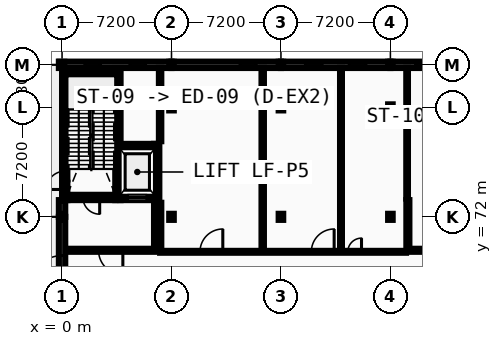
"""IFC4 building model, lengths in metres.
Left out: names, types, materials, properties, quantities, classifications, styles, units other than length and angle.
Written with IfcOpenShell. Run it as: python <this file> out.ifc"""

import sys

from ifc_helpers import new_model, si_unit, direction, frame, frame_2d, origin, origin_2d, place, context, subcontext, project, spatial, rectangle, i_section, extrude, element, fill, save


model = new_model("IFC4")
c1 = context("Model", 3, precision=1e-05, world=origin(), true_north=direction((0.0, 1.0)))
c2 = subcontext(c1, "Body", "Model", "MODEL_VIEW")
j1 = project(units=[si_unit("LENGTHUNIT", "METRE"), si_unit("PLANEANGLEUNIT", "RADIAN")], contexts=[c1])
p1 = place(None, origin())
s1 = spatial("IfcSite", under=j1, at=p1, CompositionType="ELEMENT")
p2 = place(p1, origin())
s2 = spatial("IfcBuilding", under=s1, at=p2, CompositionType="ELEMENT")
p3 = place(p2, origin())
s3 = spatial("IfcBuildingStorey", under=s2, at=p3, CompositionType="ELEMENT", Elevation=0.0)
for number, where, z_axis, x_axis in (
    (1, (0.0, 72.0, 0.0), (0.0, 0.0, 1.0), (1.0, 0.0, 0.0)),
    (2, (0.0, 82.0, 0.0), (0.0, 0.0, 1.0), (1.0, 0.0, 0.0)),
    (3, (7.2, 72.0, 0.0), (0.0, 0.0, 1.0), (1.0, 0.0, 0.0)),
    (4, (7.2, 79.2, 0.0), (0.0, 0.0, 1.0), (1.0, 0.0, 0.0)),
    (5, (7.2, 82.0, 0.0), (0.0, 0.0, 1.0), (1.0, 0.0, 0.0)),
    (6, (14.4, 72.0, 0.0), (0.0, 0.0, 1.0), (1.0, 0.0, 0.0)),
    (7, (14.4, 79.2, 0.0), (0.0, 0.0, 1.0), (1.0, 0.0, 0.0)),
    (8, (14.4, 82.0, 0.0), (0.0, 0.0, 1.0), (1.0, 0.0, 0.0)),
    (9, (21.6, 72.0, 0.0), (0.0, 0.0, 1.0), (1.0, 0.0, 0.0)),
    (10, (21.6, 79.2, 0.0), (0.0, 0.0, 1.0), (1.0, 0.0, 0.0)),
    (11, (21.6, 82.0, 0.0), (0.0, 0.0, 1.0), (1.0, 0.0, 0.0)),
):
    element("IfcColumn", number, at=place(p3, frame(where, z_axis=z_axis, x_axis=x_axis)), inside=s3, PredefinedType="COLUMN", context=c2, shape_type="SweptSolid", body=[
        extrude(i_section(OverallWidth=0.3, OverallDepth=0.4, WebThickness=0.013, FlangeThickness=0.024, FilletRadius=0.027, at=origin_2d()), origin(), (0.0, 0.0, 1.0), 5.2),
    ])
p4 = place(p3, frame((7.2, 82.0, 0.0), z_axis=(0.0, 0.0, 1.0), x_axis=(-1.0, 0.0, 0.0)))
e12 = element("IfcWall", 12, at=p4, inside=s3, PredefinedType="STANDARD", context=c2, shape_type="SweptSolid", body=[
    extrude(rectangle(XDim=7.41, YDim=0.42, at=frame_2d((3.705, 0.0))), origin(), (0.0, 0.0, 1.0), 4.635),
])
p5 = place(p4, frame((1.708, 0.0, 0.95)))
e13 = element("IfcOpeningElement", 13, at=p5, cuts=e12, PredefinedType="OPENING", context=c2, shape_type="SweptSolid", body=[
    extrude(rectangle(XDim=1.03, YDim=1.404, at=frame_2d((0.515, 0.702))), frame((0.0, 0.22, 0.0), z_axis=(0.0, -1.0, 0.0), x_axis=(1.0, 0.0, 0.0)), (0.0, 0.0, 1.0), 0.44),
])
p6 = place(p4, frame((4.672, 0.0, 0.95)))
e14 = element("IfcOpeningElement", 14, at=p6, cuts=e12, PredefinedType="OPENING", context=c2, shape_type="SweptSolid", body=[
    extrude(rectangle(XDim=1.03, YDim=1.404, at=frame_2d((0.515, 0.702))), frame((0.0, 0.22, 0.0), z_axis=(0.0, -1.0, 0.0), x_axis=(1.0, 0.0, 0.0)), (0.0, 0.0, 1.0), 0.44),
])
p7 = place(p3, frame((14.4, 82.0, 0.0), z_axis=(0.0, 0.0, 1.0), x_axis=(-1.0, 0.0, 0.0)))
e15 = element("IfcWall", 15, at=p7, inside=s3, PredefinedType="STANDARD", context=c2, shape_type="SweptSolid", body=[
    extrude(rectangle(XDim=7.2, YDim=0.42, at=frame_2d((3.6, 0.0))), origin(), (0.0, 0.0, 1.0), 4.635),
])
p8 = place(p7, frame((1.628, 0.0, 0.95)))
e16 = element("IfcOpeningElement", 16, at=p8, cuts=e15, PredefinedType="OPENING", context=c2, shape_type="SweptSolid", body=[
    extrude(rectangle(XDim=1.064, YDim=1.404, at=frame_2d((0.532, 0.702))), frame((0.0, 0.22, 0.0), z_axis=(0.0, -1.0, 0.0), x_axis=(1.0, 0.0, 0.0)), (0.0, 0.0, 1.0), 0.44),
])
p9 = place(p3, frame((21.6, 82.0, 0.0), z_axis=(0.0, 0.0, 1.0), x_axis=(-1.0, 0.0, 0.0)))
e17 = element("IfcWall", 17, at=p9, inside=s3, PredefinedType="STANDARD", context=c2, shape_type="SweptSolid", body=[
    extrude(rectangle(XDim=7.2, YDim=0.42, at=frame_2d((3.6, 0.0))), origin(), (0.0, 0.0, 1.0), 4.635),
])
p10 = place(p9, frame((1.611, 0.0, 0.95)))
e18 = element("IfcOpeningElement", 18, at=p10, cuts=e17, PredefinedType="OPENING", context=c2, shape_type="SweptSolid", body=[
    extrude(rectangle(XDim=1.098, YDim=1.404, at=frame_2d((0.549, 0.702))), frame((0.0, 0.22, 0.0), z_axis=(0.0, -1.0, 0.0), x_axis=(1.0, 0.0, 0.0)), (0.0, 0.0, 1.0), 0.44),
])
p11 = place(p9, frame((4.491, 0.0, 0.95)))
e19 = element("IfcOpeningElement", 19, at=p11, cuts=e17, PredefinedType="OPENING", context=c2, shape_type="SweptSolid", body=[
    extrude(rectangle(XDim=1.098, YDim=1.404, at=frame_2d((0.549, 0.702))), frame((0.0, 0.22, 0.0), z_axis=(0.0, -1.0, 0.0), x_axis=(1.0, 0.0, 0.0)), (0.0, 0.0, 1.0), 0.44),
])
p12 = place(p3, frame((29.01, 82.0, 0.0), z_axis=(0.0, 0.0, 1.0), x_axis=(-1.0, 0.0, 0.0)))
e20 = element("IfcWall", 20, at=p12, inside=s3, PredefinedType="STANDARD", context=c2, shape_type="SweptSolid", body=[
    extrude(rectangle(XDim=7.41, YDim=0.42, at=frame_2d((3.705, 0.0))), origin(), (0.0, 0.0, 1.0), 4.635),
])
p13 = place(p12, frame((1.657, 0.0, 0.95)))
e21 = element("IfcOpeningElement", 21, at=p13, cuts=e20, PredefinedType="OPENING", context=c2, shape_type="SweptSolid", body=[
    extrude(rectangle(XDim=1.132, YDim=1.404, at=frame_2d((0.566, 0.702))), frame((0.0, 0.22, 0.0), z_axis=(0.0, -1.0, 0.0), x_axis=(1.0, 0.0, 0.0)), (0.0, 0.0, 1.0), 0.44),
])
p14 = place(p12, frame((4.621, 0.0, 0.95)))
e22 = element("IfcOpeningElement", 22, at=p14, cuts=e20, PredefinedType="OPENING", context=c2, shape_type="SweptSolid", body=[
    extrude(rectangle(XDim=1.132, YDim=1.404, at=frame_2d((0.566, 0.702))), frame((0.0, 0.22, 0.0), z_axis=(0.0, -1.0, 0.0), x_axis=(1.0, 0.0, 0.0)), (0.0, 0.0, 1.0), 0.44),
])
p15 = place(p3, frame((0.0, 72.0, 0.0), z_axis=(0.0, 0.0, 1.0), x_axis=(0.0, -1.0, 0.0)))
e23 = element("IfcWall", 23, at=p15, inside=s3, PredefinedType="STANDARD", context=c2, shape_type="SweptSolid", body=[
    extrude(rectangle(XDim=7.2, YDim=0.42, at=frame_2d((3.6, 0.0))), origin(), (0.0, 0.0, 1.0), 4.565),
])
p16 = place(p15, frame((2.55, 0.0, 0.0)))
e24 = element("IfcOpeningElement", 24, at=p16, cuts=e23, PredefinedType="OPENING", context=c2, shape_type="SweptSolid", body=[
    extrude(rectangle(XDim=2.1, YDim=2.4, at=frame_2d((1.05, 1.2))), frame((0.0, 0.22, 0.0), z_axis=(0.0, -1.0, 0.0), x_axis=(1.0, 0.0, 0.0)), (0.0, 0.0, 1.0), 0.44),
])
p17 = place(p3, frame((0.0, 73.1, 0.0), z_axis=(0.0, 0.0, 1.0), x_axis=(0.0, -1.0, 0.0)))
e25 = element("IfcWall", 25, at=p17, inside=s3, PredefinedType="STANDARD", context=c2, shape_type="SweptSolid", body=[
    extrude(rectangle(XDim=1.1, YDim=0.42, at=frame_2d((0.55, 0.0))), origin(), (0.0, 0.0, 1.0), 4.94),
])
p18 = place(p3, frame((0.35, 73.275, 0.0), z_axis=(0.0, 0.0, 1.0), x_axis=(1.0, 0.0, 0.0)))
e26 = element("IfcWall", 26, at=p18, inside=s3, PredefinedType="SHEAR", context=c2, shape_type="SweptSolid", body=[
    extrude(rectangle(XDim=3.15, YDim=0.35, at=frame_2d((1.575, 0.0))), origin(), (0.0, 0.0, 1.0), 4.94),
])
p19 = place(p18, frame((1.025, 0.0, 0.0)))
e27 = element("IfcOpeningElement", 27, at=p19, cuts=e26, PredefinedType="OPENING", context=c2, shape_type="SweptSolid", body=[
    extrude(rectangle(XDim=1.1, YDim=2.15, at=frame_2d((0.55, 1.075))), frame((0.0, 0.185, 0.0), z_axis=(0.0, -1.0, 0.0), x_axis=(1.0, 0.0, 0.0)), (0.0, 0.0, 1.0), 0.37),
])
p20 = place(p3, frame((0.35, 81.425, 0.0), z_axis=(0.0, 0.0, 1.0), x_axis=(1.0, 0.0, 0.0)))
e28 = element("IfcWall", 28, at=p20, inside=s3, PredefinedType="SHEAR", context=c2, shape_type="SweptSolid", body=[
    extrude(rectangle(XDim=3.15, YDim=0.35, at=frame_2d((1.575, 0.0))), origin(), (0.0, 0.0, 1.0), 4.94),
])
p21 = place(p3, frame((0.175, 73.1, 0.0), z_axis=(0.0, 0.0, 1.0), x_axis=(0.0, 1.0, 0.0)))
e29 = element("IfcWall", 29, at=p21, inside=s3, PredefinedType="SHEAR", context=c2, shape_type="SweptSolid", body=[
    extrude(rectangle(XDim=8.69, YDim=0.35, at=frame_2d((4.345, 0.0))), origin(), (0.0, 0.0, 1.0), 4.94),
])
p22 = place(p21, frame((0.7, 0.0, 0.0)))
e30 = element("IfcOpeningElement", 30, at=p22, cuts=e29, PredefinedType="OPENING", context=c2, shape_type="SweptSolid", body=[
    extrude(rectangle(XDim=1.2, YDim=2.15, at=frame_2d((0.6, 1.075))), frame((0.0, 0.185, 0.0), z_axis=(0.0, -1.0, 0.0), x_axis=(1.0, 0.0, 0.0)), (0.0, 0.0, 1.0), 0.37),
])
p23 = place(p3, frame((3.675, 73.1, 0.0), z_axis=(0.0, 0.0, 1.0), x_axis=(0.0, 1.0, 0.0)))
e31 = element("IfcWall", 31, at=p23, inside=s3, PredefinedType="SHEAR", context=c2, shape_type="SweptSolid", body=[
    extrude(rectangle(XDim=8.69, YDim=0.35, at=frame_2d((4.345, 0.0))), origin(), (0.0, 0.0, 1.0), 4.94),
])
p24 = place(p3, frame((3.85, 73.275, 0.0), z_axis=(0.0, 0.0, 1.0), x_axis=(1.0, 0.0, 0.0)))
e32 = element("IfcWall", 32, at=p24, inside=s3, PredefinedType="SHEAR", context=c2, shape_type="SweptSolid", body=[
    extrude(rectangle(XDim=2.2, YDim=0.35, at=frame_2d((1.1, 0.0))), origin(), (0.0, 0.0, 1.0), 4.94),
])
p25 = place(p24, frame((0.5, 0.0, 0.0)))
e33 = element("IfcOpeningElement", 33, at=p25, cuts=e32, PredefinedType="OPENING", context=c2, shape_type="SweptSolid", body=[
    extrude(rectangle(XDim=1.2, YDim=2.2, at=frame_2d((0.6, 1.1))), frame((0.0, 0.185, 0.0), z_axis=(0.0, -1.0, 0.0), x_axis=(1.0, 0.0, 0.0)), (0.0, 0.0, 1.0), 0.37),
])
p26 = place(p3, frame((3.85, 76.625, 0.0), z_axis=(0.0, 0.0, 1.0), x_axis=(1.0, 0.0, 0.0)))
e34 = element("IfcWall", 34, at=p26, inside=s3, PredefinedType="SHEAR", context=c2, shape_type="SweptSolid", body=[
    extrude(rectangle(XDim=2.2, YDim=0.35, at=frame_2d((1.1, 0.0))), origin(), (0.0, 0.0, 1.0), 4.94),
])
p27 = place(p3, frame((6.225, 73.1, 0.0), z_axis=(0.0, 0.0, 1.0), x_axis=(0.0, 1.0, 0.0)))
e35 = element("IfcWall", 35, at=p27, inside=s3, PredefinedType="SHEAR", context=c2, shape_type="SweptSolid", body=[
    extrude(rectangle(XDim=3.7, YDim=0.35, at=frame_2d((1.85, 0.0))), origin(), (0.0, 0.0, 1.0), 4.94),
])
p28 = place(p3, frame((0.35, 69.8, 0.0), z_axis=(0.0, 0.0, 1.0), x_axis=(1.0, 0.0, 0.0)))
e36 = element("IfcWall", 36, at=p28, inside=s3, PredefinedType="PARTITIONING", context=c2, shape_type="SweptSolid", body=[
    extrude(rectangle(XDim=5.7, YDim=0.2, at=frame_2d((2.85, 0.0))), origin(), (0.0, 0.0, 1.0), 4.94),
])
p29 = place(p28, frame((2.05, 0.0, 0.0)))
e37 = element("IfcOpeningElement", 37, at=p29, cuts=e36, PredefinedType="OPENING", context=c2, shape_type="SweptSolid", body=[
    extrude(rectangle(XDim=1.6, YDim=2.2, at=frame_2d((0.8, 1.1))), frame((0.0, 0.11, 0.0), z_axis=(0.0, -1.0, 0.0), x_axis=(1.0, 0.0, 0.0)), (0.0, 0.0, 1.0), 0.22),
])
p30 = place(p3, frame((6.15, 69.9, 0.0), z_axis=(0.0, 0.0, 1.0), x_axis=(0.0, 1.0, 0.0)))
e38 = element("IfcWall", 38, at=p30, inside=s3, PredefinedType="PARTITIONING", context=c2, shape_type="SweptSolid", body=[
    extrude(rectangle(XDim=3.2, YDim=0.2, at=frame_2d((1.6, 0.0))), origin(), (0.0, 0.0, 1.0), 4.94),
])
p31 = place(p3, frame((22.85, 69.8, 0.0), z_axis=(0.0, 0.0, 1.0), x_axis=(1.0, 0.0, 0.0)))
e39 = element("IfcWall", 39, at=p31, inside=s3, PredefinedType="PARTITIONING", context=c2, shape_type="SweptSolid", body=[
    extrude(rectangle(XDim=5.6, YDim=0.2, at=frame_2d((2.8, 0.0))), origin(), (0.0, 0.0, 1.0), 4.94),
])
p32 = place(p31, frame((2.0, 0.0, 0.0)))
e40 = element("IfcOpeningElement", 40, at=p32, cuts=e39, PredefinedType="OPENING", context=c2, shape_type="SweptSolid", body=[
    extrude(rectangle(XDim=1.6, YDim=2.2, at=frame_2d((0.8, 1.1))), frame((0.0, 0.11, 0.0), z_axis=(0.0, -1.0, 0.0), x_axis=(1.0, 0.0, 0.0)), (0.0, 0.0, 1.0), 0.22),
])
p33 = place(p3, frame((22.75, 69.9, 0.0), z_axis=(0.0, 0.0, 1.0), x_axis=(0.0, 1.0, 0.0)))
e41 = element("IfcWall", 41, at=p33, inside=s3, PredefinedType="PARTITIONING", context=c2, shape_type="SweptSolid", body=[
    extrude(rectangle(XDim=3.2, YDim=0.2, at=frame_2d((1.6, 0.0))), origin(), (0.0, 0.0, 1.0), 4.94),
])
p34 = place(p3, frame((6.45, 69.7, 0.0), z_axis=(0.0, 0.0, 1.0), x_axis=(1.0, 0.0, 0.0)))
e42 = element("IfcWall", 42, at=p34, inside=s3, PredefinedType="PARTITIONING", context=c2, shape_type="SweptSolid", body=[
    extrude(rectangle(XDim=16.18, YDim=0.125, at=frame_2d((8.09, 0.0))), origin(), (0.0, 0.0, 1.0), 4.94),
])
p35 = place(p34, frame((12.35, 0.0, 0.0)))
e43 = element("IfcOpeningElement", 43, at=p35, cuts=e42, PredefinedType="OPENING", context=c2, shape_type="SweptSolid", body=[
    extrude(rectangle(XDim=0.9, YDim=2.1, at=frame_2d((0.45, 1.05))), frame((0.0, 0.073, 0.0), z_axis=(0.0, -1.0, 0.0), x_axis=(1.0, 0.0, 0.0)), (0.0, 0.0, 1.0), 0.145),
])
p36 = place(p34, frame((9.95, 0.0, 0.0)))
e44 = element("IfcOpeningElement", 44, at=p36, cuts=e42, PredefinedType="OPENING", context=c2, shape_type="SweptSolid", body=[
    extrude(rectangle(XDim=1.5, YDim=2.2, at=frame_2d((0.75, 1.1))), frame((0.0, 0.073, 0.0), z_axis=(0.0, -1.0, 0.0), x_axis=(1.0, 0.0, 0.0)), (0.0, 0.0, 1.0), 0.145),
])
p37 = place(p34, frame((2.625, 0.0, 0.0)))
e45 = element("IfcOpeningElement", 45, at=p37, cuts=e42, PredefinedType="OPENING", context=c2, shape_type="SweptSolid", body=[
    extrude(rectangle(XDim=1.5, YDim=2.2, at=frame_2d((0.75, 1.1))), frame((0.0, 0.073, 0.0), z_axis=(0.0, -1.0, 0.0), x_axis=(1.0, 0.0, 0.0)), (0.0, 0.0, 1.0), 0.145),
])
p38 = place(p3, frame((6.45, 69.762, 0.0), z_axis=(0.0, 0.0, 1.0), x_axis=(0.0, 1.0, 0.0)))
e46 = element("IfcWall", 46, at=p38, inside=s3, PredefinedType="PARTITIONING", context=c2, shape_type="SweptSolid", body=[
    extrude(rectangle(XDim=3.163, YDim=0.158, at=frame_2d((1.581, 0.0))), origin(), (0.0, 0.0, 1.0), 4.94),
])
p39 = place(p3, frame((6.45, 76.975, 0.0), z_axis=(0.0, 0.0, 1.0), x_axis=(0.0, 1.0, 0.0)))
e47 = element("IfcWall", 47, at=p39, inside=s3, PredefinedType="PARTITIONING", context=c2, shape_type="SweptSolid", body=[
    extrude(rectangle(XDim=4.825, YDim=0.158, at=frame_2d((2.413, 0.0))), origin(), (0.0, 0.0, 1.0), 4.94),
])
p40 = place(p3, frame((13.2, 69.762, 0.0), z_axis=(0.0, 0.0, 1.0), x_axis=(0.0, 1.0, 0.0)))
e48 = element("IfcWall", 48, at=p40, inside=s3, PredefinedType="PARTITIONING", context=c2, shape_type="SweptSolid", body=[
    extrude(rectangle(XDim=12.038, YDim=0.158, at=frame_2d((6.019, 0.0))), origin(), (0.0, 0.0, 1.0), 4.94),
])
p41 = place(p3, frame((18.35, 69.762, 0.0), z_axis=(0.0, 0.0, 1.0), x_axis=(0.0, 1.0, 0.0)))
e49 = element("IfcWall", 49, at=p41, inside=s3, PredefinedType="PARTITIONING", context=c2, shape_type="SweptSolid", body=[
    extrude(rectangle(XDim=12.038, YDim=0.125, at=frame_2d((6.019, 0.0))), origin(), (0.0, 0.0, 1.0), 4.94),
])
p42 = place(p3, frame((22.7, 73.2, 0.0), z_axis=(0.0, 0.0, 1.0), x_axis=(0.0, 1.0, 0.0)))
e50 = element("IfcWall", 50, at=p42, inside=s3, PredefinedType="PARTITIONING", context=c2, shape_type="SweptSolid", body=[
    extrude(rectangle(XDim=8.6, YDim=0.11, at=frame_2d((4.3, 0.0))), origin(), (0.0, 0.0, 1.0), 4.94),
])
p43 = place(p5, origin())
e51 = element("IfcWindow", 51, at=p43, inside=s3, PartitioningType="SINGLE_PANEL", PredefinedType="WINDOW", context=c2, shape_type="SweptSolid", body=[
    extrude(rectangle(XDim=1.03, YDim=1.404, at=frame_2d((0.515, 0.702))), frame((0.0, 0.03, 0.0), z_axis=(0.0, -1.0, 0.0), x_axis=(1.0, 0.0, 0.0)), (0.0, 0.0, 1.0), 0.06),
])
fill(e13, e51)
p44 = place(p6, origin())
e52 = element("IfcWindow", 52, at=p44, inside=s3, PartitioningType="SINGLE_PANEL", PredefinedType="WINDOW", context=c2, shape_type="SweptSolid", body=[
    extrude(rectangle(XDim=1.03, YDim=1.404, at=frame_2d((0.515, 0.702))), frame((0.0, 0.03, 0.0), z_axis=(0.0, -1.0, 0.0), x_axis=(1.0, 0.0, 0.0)), (0.0, 0.0, 1.0), 0.06),
])
fill(e14, e52)
p45 = place(p8, origin())
e53 = element("IfcWindow", 53, at=p45, inside=s3, PartitioningType="SINGLE_PANEL", PredefinedType="WINDOW", context=c2, shape_type="SweptSolid", body=[
    extrude(rectangle(XDim=1.064, YDim=1.404, at=frame_2d((0.532, 0.702))), frame((0.0, 0.03, 0.0), z_axis=(0.0, -1.0, 0.0), x_axis=(1.0, 0.0, 0.0)), (0.0, 0.0, 1.0), 0.06),
])
fill(e16, e53)
p46 = place(p10, origin())
e54 = element("IfcWindow", 54, at=p46, inside=s3, PartitioningType="SINGLE_PANEL", PredefinedType="WINDOW", context=c2, shape_type="SweptSolid", body=[
    extrude(rectangle(XDim=1.098, YDim=1.404, at=frame_2d((0.549, 0.702))), frame((0.0, 0.03, 0.0), z_axis=(0.0, -1.0, 0.0), x_axis=(1.0, 0.0, 0.0)), (0.0, 0.0, 1.0), 0.06),
])
fill(e18, e54)
p47 = place(p11, origin())
e55 = element("IfcWindow", 55, at=p47, inside=s3, PartitioningType="SINGLE_PANEL", PredefinedType="WINDOW", context=c2, shape_type="SweptSolid", body=[
    extrude(rectangle(XDim=1.098, YDim=1.404, at=frame_2d((0.549, 0.702))), frame((0.0, 0.03, 0.0), z_axis=(0.0, -1.0, 0.0), x_axis=(1.0, 0.0, 0.0)), (0.0, 0.0, 1.0), 0.06),
])
fill(e19, e55)
p48 = place(p14, origin())
e56 = element("IfcWindow", 56, at=p48, inside=s3, PartitioningType="SINGLE_PANEL", PredefinedType="WINDOW", context=c2, shape_type="SweptSolid", body=[
    extrude(rectangle(XDim=1.132, YDim=1.404, at=frame_2d((0.566, 0.702))), frame((0.0, 0.03, 0.0), z_axis=(0.0, -1.0, 0.0), x_axis=(1.0, 0.0, 0.0)), (0.0, 0.0, 1.0), 0.06),
])
fill(e22, e56)
p49 = place(p16, origin())
e57 = element("IfcDoor", 57, at=p49, inside=s3, OperationType="DOUBLE_DOOR_SINGLE_SWING", PredefinedType="DOOR", context=c2, shape_type="SweptSolid", body=[
    extrude(rectangle(XDim=2.1, YDim=2.4, at=frame_2d((1.05, 1.2))), frame((0.0, 0.025, 0.0), z_axis=(0.0, -1.0, 0.0), x_axis=(1.0, 0.0, 0.0)), (0.0, 0.0, 1.0), 0.05),
])
fill(e24, e57)
p50 = place(p19, origin())
e58 = element("IfcDoor", 58, at=p50, inside=s3, OperationType="SINGLE_SWING_RIGHT", PredefinedType="DOOR", context=c2, shape_type="SweptSolid", body=[
    extrude(rectangle(XDim=1.1, YDim=2.15, at=frame_2d((0.55, 1.075))), frame((0.0, 0.025, 0.0), z_axis=(0.0, -1.0, 0.0), x_axis=(1.0, 0.0, 0.0)), (0.0, 0.0, 1.0), 0.05),
])
fill(e27, e58)
p51 = place(p22, origin())
e59 = element("IfcDoor", 59, at=p51, inside=s3, OperationType="SINGLE_SWING_LEFT", PredefinedType="DOOR", context=c2, shape_type="SweptSolid", body=[
    extrude(rectangle(XDim=1.2, YDim=2.15, at=frame_2d((0.6, 1.075))), frame((0.0, 0.025, 0.0), z_axis=(0.0, -1.0, 0.0), x_axis=(1.0, 0.0, 0.0)), (0.0, 0.0, 1.0), 0.05),
])
fill(e30, e59)
p52 = place(p25, origin())
e60 = element("IfcDoor", 60, at=p52, inside=s3, OperationType="SLIDING_TO_RIGHT", PredefinedType="DOOR", context=c2, shape_type="SweptSolid", body=[
    extrude(rectangle(XDim=1.2, YDim=2.2, at=frame_2d((0.6, 1.1))), frame((0.0, 0.025, 0.0), z_axis=(0.0, -1.0, 0.0), x_axis=(1.0, 0.0, 0.0)), (0.0, 0.0, 1.0), 0.05),
])
fill(e33, e60)
p53 = place(p29, origin())
e61 = element("IfcDoor", 61, at=p53, inside=s3, OperationType="DOUBLE_DOOR_SINGLE_SWING", PredefinedType="DOOR", context=c2, shape_type="SweptSolid", body=[
    extrude(rectangle(XDim=1.6, YDim=2.2, at=frame_2d((0.8, 1.1))), frame((0.0, 0.025, 0.0), z_axis=(0.0, -1.0, 0.0), x_axis=(1.0, 0.0, 0.0)), (0.0, 0.0, 1.0), 0.05),
])
fill(e37, e61)
p54 = place(p35, frame((0.9, 0.0, 0.0), z_axis=(0.0, 0.0, 1.0), x_axis=(-1.0, 0.0, 0.0)))
e62 = element("IfcDoor", 62, at=p54, inside=s3, OperationType="SINGLE_SWING_RIGHT", PredefinedType="DOOR", context=c2, shape_type="SweptSolid", body=[
    extrude(rectangle(XDim=0.9, YDim=2.1, at=frame_2d((0.45, 1.05))), frame((0.0, 0.025, 0.0), z_axis=(0.0, -1.0, 0.0), x_axis=(1.0, 0.0, 0.0)), (0.0, 0.0, 1.0), 0.05),
])
fill(e43, e62)
p55 = place(p36, frame((1.5, 0.0, 0.0), z_axis=(0.0, 0.0, 1.0), x_axis=(-1.0, 0.0, 0.0)))
e63 = element("IfcDoor", 63, at=p55, inside=s3, OperationType="DOUBLE_DOOR_SINGLE_SWING", PredefinedType="DOOR", context=c2, shape_type="SweptSolid", body=[
    extrude(rectangle(XDim=1.5, YDim=2.2, at=frame_2d((0.75, 1.1))), frame((0.0, 0.025, 0.0), z_axis=(0.0, -1.0, 0.0), x_axis=(1.0, 0.0, 0.0)), (0.0, 0.0, 1.0), 0.05),
])
fill(e44, e63)
p56 = place(p37, frame((1.5, 0.0, 0.0), z_axis=(0.0, 0.0, 1.0), x_axis=(-1.0, 0.0, 0.0)))
e64 = element("IfcDoor", 64, at=p56, inside=s3, OperationType="DOUBLE_DOOR_SINGLE_SWING", PredefinedType="DOOR", context=c2, shape_type="SweptSolid", body=[
    extrude(rectangle(XDim=1.5, YDim=2.2, at=frame_2d((0.75, 1.1))), frame((0.0, 0.025, 0.0), z_axis=(0.0, -1.0, 0.0), x_axis=(1.0, 0.0, 0.0)), (0.0, 0.0, 1.0), 0.05),
])
fill(e45, e64)
save(model, sys.argv[1])
